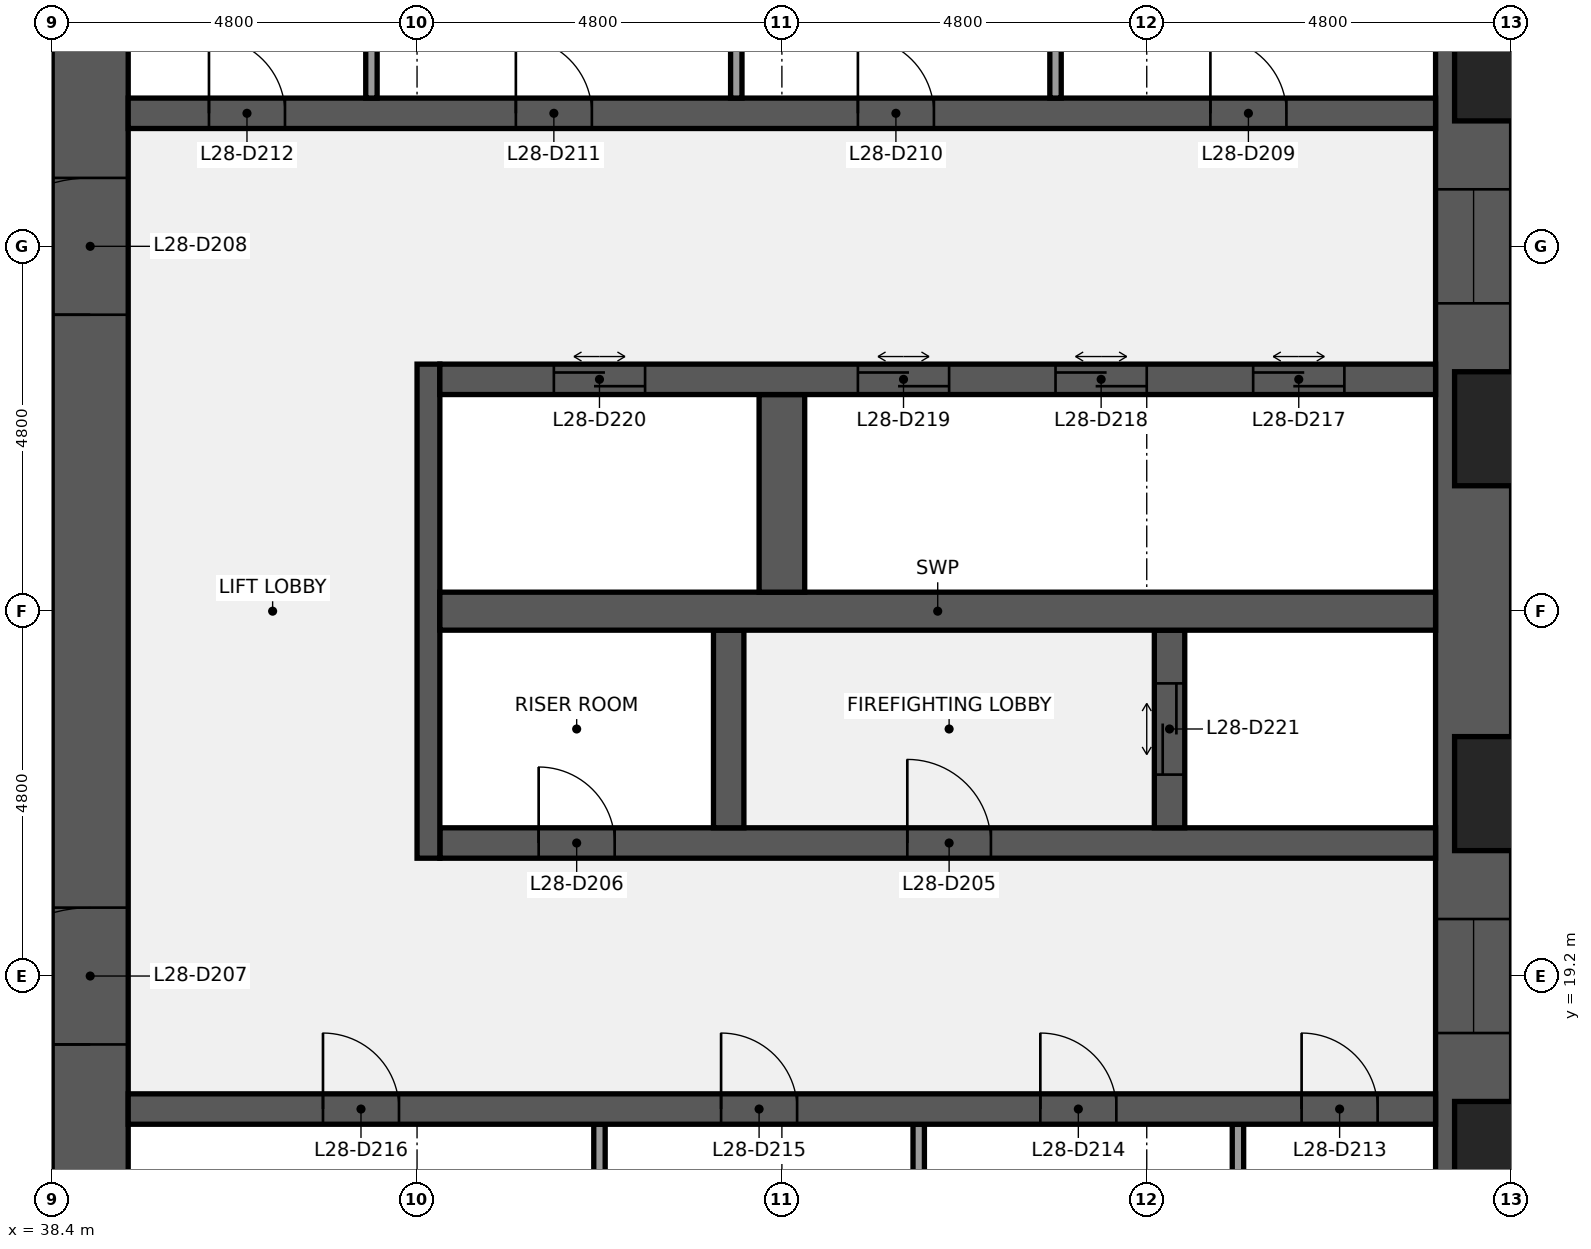
"""IFC4 building model, lengths in metres.
Left out: names, types, materials, properties, quantities, classifications, styles, units other than length and angle.
Written with IfcOpenShell. Run it as: python <this file> out.ifc"""

import sys

from ifc_helpers import new_model, si_unit, direction, frame, frame_2d, origin, place, context, subcontext, project, spatial, rectangle, extrude, element, fill, save


model = new_model("IFC4")
c1 = context("Model", 3, precision=1e-05, world=origin(), true_north=direction((0.0, 1.0)))
c2 = subcontext(c1, "Body", "Model", "MODEL_VIEW")
j1 = project(units=[si_unit("LENGTHUNIT", "METRE"), si_unit("PLANEANGLEUNIT", "RADIAN")], contexts=[c1])
p1 = place(None, origin())
s1 = spatial("IfcSite", under=j1, at=p1, CompositionType="ELEMENT")
p2 = place(p1, origin())
s2 = spatial("IfcBuilding", under=s1, at=p2, CompositionType="ELEMENT")
p3 = place(p2, frame((0.0, 0.0, 132.1)))
s3 = spatial("IfcBuildingStorey", under=s2, at=p3, CompositionType="ELEMENT", Elevation=132.1)
p4 = place(p3, frame((57.1, 38.4, 0.0), z_axis=(0.0, 0.0, 1.0), x_axis=(0.0, -1.0, 0.0)))
e1 = element("IfcWall", 1, at=p4, inside=s3, PredefinedType="SHEAR", context=c2, shape_type="SweptSolid", body=[
    extrude(rectangle(XDim=28.8, YDim=1.0, at=frame_2d((14.4, 0.0))), origin(), (0.0, 0.0, 1.0), 3.84),
])
p5 = place(p4, frame((18.45, 0.0, 0.9)))
e2 = element("IfcOpeningElement", 2, at=p5, cuts=e1, PredefinedType="OPENING", context=c2, shape_type="SweptSolid", body=[
    extrude(rectangle(XDim=1.5, YDim=1.5, at=frame_2d((0.75, 0.75))), frame((0.0, 0.51, 0.0), z_axis=(0.0, -1.0, 0.0), x_axis=(1.0, 0.0, 0.0)), (0.0, 0.0, 1.0), 1.02),
])
p6 = place(p4, frame((8.85, 0.0, 0.9)))
e3 = element("IfcOpeningElement", 3, at=p6, cuts=e1, PredefinedType="OPENING", context=c2, shape_type="SweptSolid", body=[
    extrude(rectangle(XDim=1.5, YDim=1.5, at=frame_2d((0.75, 0.75))), frame((0.0, 0.51, 0.0), z_axis=(0.0, -1.0, 0.0), x_axis=(1.0, 0.0, 0.0)), (0.0, 0.0, 1.0), 1.02),
])
p7 = place(p3, frame((38.9, 9.6, 0.0), z_axis=(0.0, 0.0, 1.0), x_axis=(0.0, 1.0, 0.0)))
e4 = element("IfcWall", 4, at=p7, inside=s3, PredefinedType="SHEAR", context=c2, shape_type="SweptSolid", body=[
    extrude(rectangle(XDim=28.8, YDim=1.0, at=frame_2d((14.4, 0.0))), origin(), (0.0, 0.0, 1.0), 3.84),
])
p8 = place(p7, frame((8.7, 0.0, 0.0)))
e5 = element("IfcOpeningElement", 5, at=p8, cuts=e4, PredefinedType="OPENING", context=c2, shape_type="SweptSolid", body=[
    extrude(rectangle(XDim=1.8, YDim=2.1, at=frame_2d((0.9, 1.05))), frame((0.0, 0.51, 0.0), z_axis=(0.0, -1.0, 0.0), x_axis=(1.0, 0.0, 0.0)), (0.0, 0.0, 1.0), 1.02),
])
p9 = place(p7, frame((18.3, 0.0, 0.0)))
e6 = element("IfcOpeningElement", 6, at=p9, cuts=e4, PredefinedType="OPENING", context=c2, shape_type="SweptSolid", body=[
    extrude(rectangle(XDim=1.8, YDim=2.1, at=frame_2d((0.9, 1.05))), frame((0.0, 0.51, 0.0), z_axis=(0.0, -1.0, 0.0), x_axis=(1.0, 0.0, 0.0)), (0.0, 0.0, 1.0), 1.02),
])
for number, where, z_axis, x_axis in (
    (7, (54.0, 14.65, 0.0), (0.0, 0.0, 1.0), (0.0, 1.0, 0.0)),
    (8, (49.8, 14.65, 0.0), (0.0, 0.0, 1.0), (0.0, 1.0, 0.0)),
    (9, (45.6, 14.65, 0.0), (0.0, 0.0, 1.0), (0.0, 1.0, 0.0)),
):
    element("IfcWall", number, at=place(p3, frame(where, z_axis=z_axis, x_axis=x_axis)), inside=s3, PredefinedType="PARTITIONING", context=c2, shape_type="SweptSolid", body=[
        extrude(rectangle(XDim=2.6, YDim=0.15, at=frame_2d((1.3, 0.0))), origin(), (0.0, 0.0, 1.0), 3.84),
    ])
p10 = place(p3, frame((39.4, 17.45, 0.0), z_axis=(0.0, 0.0, 1.0), x_axis=(1.0, 0.0, 0.0)))
e10 = element("IfcWall", 10, at=p10, inside=s3, PredefinedType="SHEAR", context=c2, shape_type="SweptSolid", body=[
    extrude(rectangle(XDim=17.2, YDim=0.4, at=frame_2d((8.6, 0.0))), origin(), (0.0, 0.0, 1.0), 3.84),
])
p11 = place(p10, frame((15.438, 0.0, 0.0)))
e11 = element("IfcOpeningElement", 11, at=p11, cuts=e10, PredefinedType="OPENING", context=c2, shape_type="SweptSolid", body=[
    extrude(rectangle(XDim=1.0, YDim=2.1, at=frame_2d((0.5, 1.05))), frame((0.0, 0.21, 0.0), z_axis=(0.0, -1.0, 0.0), x_axis=(1.0, 0.0, 0.0)), (0.0, 0.0, 1.0), 0.42),
])
p12 = place(p10, frame((12.0, 0.0, 0.0)))
e12 = element("IfcOpeningElement", 12, at=p12, cuts=e10, PredefinedType="OPENING", context=c2, shape_type="SweptSolid", body=[
    extrude(rectangle(XDim=1.0, YDim=2.1, at=frame_2d((0.5, 1.05))), frame((0.0, 0.21, 0.0), z_axis=(0.0, -1.0, 0.0), x_axis=(1.0, 0.0, 0.0)), (0.0, 0.0, 1.0), 0.42),
])
p13 = place(p10, frame((7.8, 0.0, 0.0)))
e13 = element("IfcOpeningElement", 13, at=p13, cuts=e10, PredefinedType="OPENING", context=c2, shape_type="SweptSolid", body=[
    extrude(rectangle(XDim=1.0, YDim=2.1, at=frame_2d((0.5, 1.05))), frame((0.0, 0.21, 0.0), z_axis=(0.0, -1.0, 0.0), x_axis=(1.0, 0.0, 0.0)), (0.0, 0.0, 1.0), 0.42),
])
p14 = place(p10, frame((2.562, 0.0, 0.0)))
e14 = element("IfcOpeningElement", 14, at=p14, cuts=e10, PredefinedType="OPENING", context=c2, shape_type="SweptSolid", body=[
    extrude(rectangle(XDim=1.0, YDim=2.1, at=frame_2d((0.5, 1.05))), frame((0.0, 0.21, 0.0), z_axis=(0.0, -1.0, 0.0), x_axis=(1.0, 0.0, 0.0)), (0.0, 0.0, 1.0), 0.42),
])
p15 = place(p3, frame((43.5, 20.95, 0.0), z_axis=(0.0, 0.0, 1.0), x_axis=(1.0, 0.0, 0.0)))
e15 = element("IfcWall", 15, at=p15, inside=s3, PredefinedType="SHEAR", context=c2, shape_type="SweptSolid", body=[
    extrude(rectangle(XDim=13.1, YDim=0.4, at=frame_2d((6.55, 0.0))), origin(), (0.0, 0.0, 1.0), 3.84),
])
p16 = place(p15, frame((6.15, 0.0, 0.0)))
e16 = element("IfcOpeningElement", 16, at=p16, cuts=e15, PredefinedType="OPENING", context=c2, shape_type="SweptSolid", body=[
    extrude(rectangle(XDim=1.1, YDim=2.1, at=frame_2d((0.55, 1.05))), frame((0.0, 0.21, 0.0), z_axis=(0.0, -1.0, 0.0), x_axis=(1.0, 0.0, 0.0)), (0.0, 0.0, 1.0), 0.42),
])
p17 = place(p15, frame((1.3, 0.0, 0.0)))
e17 = element("IfcOpeningElement", 17, at=p17, cuts=e15, PredefinedType="OPENING", context=c2, shape_type="SweptSolid", body=[
    extrude(rectangle(XDim=1.0, YDim=2.1, at=frame_2d((0.5, 1.05))), frame((0.0, 0.21, 0.0), z_axis=(0.0, -1.0, 0.0), x_axis=(1.0, 0.0, 0.0)), (0.0, 0.0, 1.0), 0.42),
])
p18 = place(p3, frame((43.35, 20.75, 0.0), z_axis=(0.0, 0.0, 1.0), x_axis=(0.0, 1.0, 0.0)))
e18 = element("IfcWall", 18, at=p18, inside=s3, PredefinedType="SHEAR", context=c2, shape_type="SweptSolid", body=[
    extrude(rectangle(XDim=6.5, YDim=0.3, at=frame_2d((3.25, 0.0))), origin(), (0.0, 0.0, 1.0), 3.84),
])
p19 = place(p3, frame((53.1, 21.15, 0.0), z_axis=(0.0, 0.0, 1.0), x_axis=(0.0, 1.0, 0.0)))
e19 = element("IfcWall", 19, at=p19, inside=s3, PredefinedType="SHEAR", context=c2, shape_type="SweptSolid", body=[
    extrude(rectangle(XDim=2.6, YDim=0.4, at=frame_2d((1.3, 0.0))), origin(), (0.0, 0.0, 1.0), 3.84),
])
p20 = place(p19, frame((0.7, 0.0, 0.0)))
e20 = element("IfcOpeningElement", 20, at=p20, cuts=e19, PredefinedType="OPENING", context=c2, shape_type="SweptSolid", body=[
    extrude(rectangle(XDim=1.2, YDim=2.1, at=frame_2d((0.6, 1.05))), frame((0.0, 0.21, 0.0), z_axis=(0.0, -1.0, 0.0), x_axis=(1.0, 0.0, 0.0)), (0.0, 0.0, 1.0), 0.42),
])
p21 = place(p3, frame((47.3, 21.15, 0.0), z_axis=(0.0, 0.0, 1.0), x_axis=(0.0, 1.0, 0.0)))
e21 = element("IfcWall", 21, at=p21, inside=s3, PredefinedType="SHEAR", context=c2, shape_type="SweptSolid", body=[
    extrude(rectangle(XDim=2.6, YDim=0.4, at=frame_2d((1.3, 0.0))), origin(), (0.0, 0.0, 1.0), 3.84),
])
p22 = place(p3, frame((43.5, 24.0, 0.0), z_axis=(0.0, 0.0, 1.0), x_axis=(1.0, 0.0, 0.0)))
e22 = element("IfcWall", 22, at=p22, inside=s3, PredefinedType="SHEAR", context=c2, shape_type="SweptSolid", body=[
    extrude(rectangle(XDim=13.1, YDim=0.5, at=frame_2d((6.55, 0.0))), origin(), (0.0, 0.0, 1.0), 3.84),
])
p23 = place(p3, frame((48.0, 24.25, 0.0), z_axis=(0.0, 0.0, 1.0), x_axis=(0.0, 1.0, 0.0)))
e23 = element("IfcWall", 23, at=p23, inside=s3, PredefinedType="SHEAR", context=c2, shape_type="SweptSolid", body=[
    extrude(rectangle(XDim=2.6, YDim=0.6, at=frame_2d((1.3, 0.0))), origin(), (0.0, 0.0, 1.0), 3.84),
])
p24 = place(p3, frame((43.5, 27.05, 0.0), z_axis=(0.0, 0.0, 1.0), x_axis=(1.0, 0.0, 0.0)))
e24 = element("IfcWall", 24, at=p24, inside=s3, PredefinedType="SHEAR", context=c2, shape_type="SweptSolid", body=[
    extrude(rectangle(XDim=13.1, YDim=0.4, at=frame_2d((6.55, 0.0))), origin(), (0.0, 0.0, 1.0), 3.84),
])
p25 = place(p24, frame((10.7, 0.0, 0.0)))
e25 = element("IfcOpeningElement", 25, at=p25, cuts=e24, PredefinedType="OPENING", context=c2, shape_type="SweptSolid", body=[
    extrude(rectangle(XDim=1.2, YDim=2.1, at=frame_2d((0.6, 1.05))), frame((0.0, 0.21, 0.0), z_axis=(0.0, -1.0, 0.0), x_axis=(1.0, 0.0, 0.0)), (0.0, 0.0, 1.0), 0.42),
])
p26 = place(p24, frame((8.1, 0.0, 0.0)))
e26 = element("IfcOpeningElement", 26, at=p26, cuts=e24, PredefinedType="OPENING", context=c2, shape_type="SweptSolid", body=[
    extrude(rectangle(XDim=1.2, YDim=2.1, at=frame_2d((0.6, 1.05))), frame((0.0, 0.21, 0.0), z_axis=(0.0, -1.0, 0.0), x_axis=(1.0, 0.0, 0.0)), (0.0, 0.0, 1.0), 0.42),
])
p27 = place(p24, frame((5.5, 0.0, 0.0)))
e27 = element("IfcOpeningElement", 27, at=p27, cuts=e24, PredefinedType="OPENING", context=c2, shape_type="SweptSolid", body=[
    extrude(rectangle(XDim=1.2, YDim=2.1, at=frame_2d((0.6, 1.05))), frame((0.0, 0.21, 0.0), z_axis=(0.0, -1.0, 0.0), x_axis=(1.0, 0.0, 0.0)), (0.0, 0.0, 1.0), 0.42),
])
p28 = place(p24, frame((1.5, 0.0, 0.0)))
e28 = element("IfcOpeningElement", 28, at=p28, cuts=e24, PredefinedType="OPENING", context=c2, shape_type="SweptSolid", body=[
    extrude(rectangle(XDim=1.2, YDim=2.1, at=frame_2d((0.6, 1.05))), frame((0.0, 0.21, 0.0), z_axis=(0.0, -1.0, 0.0), x_axis=(1.0, 0.0, 0.0)), (0.0, 0.0, 1.0), 0.42),
])
p29 = place(p3, frame((39.4, 30.55, 0.0), z_axis=(0.0, 0.0, 1.0), x_axis=(1.0, 0.0, 0.0)))
e29 = element("IfcWall", 29, at=p29, inside=s3, PredefinedType="SHEAR", context=c2, shape_type="SweptSolid", body=[
    extrude(rectangle(XDim=17.2, YDim=0.4, at=frame_2d((8.6, 0.0))), origin(), (0.0, 0.0, 1.0), 3.84),
])
p30 = place(p29, frame((14.238, 0.0, 0.0)))
e30 = element("IfcOpeningElement", 30, at=p30, cuts=e29, PredefinedType="OPENING", context=c2, shape_type="SweptSolid", body=[
    extrude(rectangle(XDim=1.0, YDim=2.1, at=frame_2d((0.5, 1.05))), frame((0.0, 0.21, 0.0), z_axis=(0.0, -1.0, 0.0), x_axis=(1.0, 0.0, 0.0)), (0.0, 0.0, 1.0), 0.42),
])
p31 = place(p29, frame((9.6, 0.0, 0.0)))
e31 = element("IfcOpeningElement", 31, at=p31, cuts=e29, PredefinedType="OPENING", context=c2, shape_type="SweptSolid", body=[
    extrude(rectangle(XDim=1.0, YDim=2.1, at=frame_2d((0.5, 1.05))), frame((0.0, 0.21, 0.0), z_axis=(0.0, -1.0, 0.0), x_axis=(1.0, 0.0, 0.0)), (0.0, 0.0, 1.0), 0.42),
])
p32 = place(p29, frame((5.1, 0.0, 0.0)))
e32 = element("IfcOpeningElement", 32, at=p32, cuts=e29, PredefinedType="OPENING", context=c2, shape_type="SweptSolid", body=[
    extrude(rectangle(XDim=1.0, YDim=2.1, at=frame_2d((0.5, 1.05))), frame((0.0, 0.21, 0.0), z_axis=(0.0, -1.0, 0.0), x_axis=(1.0, 0.0, 0.0)), (0.0, 0.0, 1.0), 0.42),
])
p33 = place(p29, frame((1.062, 0.0, 0.0)))
e33 = element("IfcOpeningElement", 33, at=p33, cuts=e29, PredefinedType="OPENING", context=c2, shape_type="SweptSolid", body=[
    extrude(rectangle(XDim=1.0, YDim=2.1, at=frame_2d((0.5, 1.05))), frame((0.0, 0.21, 0.0), z_axis=(0.0, -1.0, 0.0), x_axis=(1.0, 0.0, 0.0)), (0.0, 0.0, 1.0), 0.42),
])
for number, where, z_axis, x_axis in (
    (34, (51.6, 30.75, 0.0), (0.0, 0.0, 1.0), (0.0, 1.0, 0.0)),
    (35, (47.4, 30.75, 0.0), (0.0, 0.0, 1.0), (0.0, 1.0, 0.0)),
    (36, (42.6, 30.75, 0.0), (0.0, 0.0, 1.0), (0.0, 1.0, 0.0)),
):
    element("IfcWall", number, at=place(p3, frame(where, z_axis=z_axis, x_axis=x_axis)), inside=s3, PredefinedType="PARTITIONING", context=c2, shape_type="SweptSolid", body=[
        extrude(rectangle(XDim=2.6, YDim=0.15, at=frame_2d((1.3, 0.0))), origin(), (0.0, 0.0, 1.0), 3.84),
    ])
p34 = place(p16, origin())
e37 = element("IfcDoor", 37, at=p34, inside=s3, OperationType="SINGLE_SWING_LEFT", PredefinedType="DOOR", context=c2, shape_type="SweptSolid", body=[
    extrude(rectangle(XDim=1.1, YDim=2.1, at=frame_2d((0.55, 1.05))), frame((0.0, 0.025, 0.0), z_axis=(0.0, -1.0, 0.0), x_axis=(1.0, 0.0, 0.0)), (0.0, 0.0, 1.0), 0.05),
])
fill(e16, e37)
p35 = place(p17, origin())
e38 = element("IfcDoor", 38, at=p35, inside=s3, OperationType="SINGLE_SWING_LEFT", PredefinedType="DOOR", context=c2, shape_type="SweptSolid", body=[
    extrude(rectangle(XDim=1.0, YDim=2.1, at=frame_2d((0.5, 1.05))), frame((0.0, 0.025, 0.0), z_axis=(0.0, -1.0, 0.0), x_axis=(1.0, 0.0, 0.0)), (0.0, 0.0, 1.0), 0.05),
])
fill(e17, e38)
p36 = place(p8, origin())
e39 = element("IfcDoor", 39, at=p36, inside=s3, OperationType="DOUBLE_DOOR_SINGLE_SWING", PredefinedType="DOOR", context=c2, shape_type="SweptSolid", body=[
    extrude(rectangle(XDim=1.8, YDim=2.1, at=frame_2d((0.9, 1.05))), frame((0.0, 0.025, 0.0), z_axis=(0.0, -1.0, 0.0), x_axis=(1.0, 0.0, 0.0)), (0.0, 0.0, 1.0), 0.05),
])
fill(e5, e39)
p37 = place(p9, origin())
e40 = element("IfcDoor", 40, at=p37, inside=s3, OperationType="DOUBLE_DOOR_SINGLE_SWING", PredefinedType="DOOR", context=c2, shape_type="SweptSolid", body=[
    extrude(rectangle(XDim=1.8, YDim=2.1, at=frame_2d((0.9, 1.05))), frame((0.0, 0.025, 0.0), z_axis=(0.0, -1.0, 0.0), x_axis=(1.0, 0.0, 0.0)), (0.0, 0.0, 1.0), 0.05),
])
fill(e6, e40)
p38 = place(p30, origin())
e41 = element("IfcDoor", 41, at=p38, inside=s3, OperationType="SINGLE_SWING_LEFT", PredefinedType="DOOR", context=c2, shape_type="SweptSolid", body=[
    extrude(rectangle(XDim=1.0, YDim=2.1, at=frame_2d((0.5, 1.05))), frame((0.0, 0.025, 0.0), z_axis=(0.0, -1.0, 0.0), x_axis=(1.0, 0.0, 0.0)), (0.0, 0.0, 1.0), 0.05),
])
fill(e30, e41)
p39 = place(p31, origin())
e42 = element("IfcDoor", 42, at=p39, inside=s3, OperationType="SINGLE_SWING_LEFT", PredefinedType="DOOR", context=c2, shape_type="SweptSolid", body=[
    extrude(rectangle(XDim=1.0, YDim=2.1, at=frame_2d((0.5, 1.05))), frame((0.0, 0.025, 0.0), z_axis=(0.0, -1.0, 0.0), x_axis=(1.0, 0.0, 0.0)), (0.0, 0.0, 1.0), 0.05),
])
fill(e31, e42)
p40 = place(p32, origin())
e43 = element("IfcDoor", 43, at=p40, inside=s3, OperationType="SINGLE_SWING_LEFT", PredefinedType="DOOR", context=c2, shape_type="SweptSolid", body=[
    extrude(rectangle(XDim=1.0, YDim=2.1, at=frame_2d((0.5, 1.05))), frame((0.0, 0.025, 0.0), z_axis=(0.0, -1.0, 0.0), x_axis=(1.0, 0.0, 0.0)), (0.0, 0.0, 1.0), 0.05),
])
fill(e32, e43)
p41 = place(p33, origin())
e44 = element("IfcDoor", 44, at=p41, inside=s3, OperationType="SINGLE_SWING_LEFT", PredefinedType="DOOR", context=c2, shape_type="SweptSolid", body=[
    extrude(rectangle(XDim=1.0, YDim=2.1, at=frame_2d((0.5, 1.05))), frame((0.0, 0.025, 0.0), z_axis=(0.0, -1.0, 0.0), x_axis=(1.0, 0.0, 0.0)), (0.0, 0.0, 1.0), 0.05),
])
fill(e33, e44)
p42 = place(p11, origin())
e45 = element("IfcDoor", 45, at=p42, inside=s3, OperationType="SINGLE_SWING_LEFT", PredefinedType="DOOR", context=c2, shape_type="SweptSolid", body=[
    extrude(rectangle(XDim=1.0, YDim=2.1, at=frame_2d((0.5, 1.05))), frame((0.0, 0.025, 0.0), z_axis=(0.0, -1.0, 0.0), x_axis=(1.0, 0.0, 0.0)), (0.0, 0.0, 1.0), 0.05),
])
fill(e11, e45)
p43 = place(p12, origin())
e46 = element("IfcDoor", 46, at=p43, inside=s3, OperationType="SINGLE_SWING_LEFT", PredefinedType="DOOR", context=c2, shape_type="SweptSolid", body=[
    extrude(rectangle(XDim=1.0, YDim=2.1, at=frame_2d((0.5, 1.05))), frame((0.0, 0.025, 0.0), z_axis=(0.0, -1.0, 0.0), x_axis=(1.0, 0.0, 0.0)), (0.0, 0.0, 1.0), 0.05),
])
fill(e12, e46)
p44 = place(p13, origin())
e47 = element("IfcDoor", 47, at=p44, inside=s3, OperationType="SINGLE_SWING_LEFT", PredefinedType="DOOR", context=c2, shape_type="SweptSolid", body=[
    extrude(rectangle(XDim=1.0, YDim=2.1, at=frame_2d((0.5, 1.05))), frame((0.0, 0.025, 0.0), z_axis=(0.0, -1.0, 0.0), x_axis=(1.0, 0.0, 0.0)), (0.0, 0.0, 1.0), 0.05),
])
fill(e13, e47)
p45 = place(p14, origin())
e48 = element("IfcDoor", 48, at=p45, inside=s3, OperationType="SINGLE_SWING_LEFT", PredefinedType="DOOR", context=c2, shape_type="SweptSolid", body=[
    extrude(rectangle(XDim=1.0, YDim=2.1, at=frame_2d((0.5, 1.05))), frame((0.0, 0.025, 0.0), z_axis=(0.0, -1.0, 0.0), x_axis=(1.0, 0.0, 0.0)), (0.0, 0.0, 1.0), 0.05),
])
fill(e14, e48)
p46 = place(p25, origin())
e49 = element("IfcDoor", 49, at=p46, inside=s3, OperationType="DOUBLE_DOOR_SLIDING", PredefinedType="DOOR", context=c2, shape_type="SweptSolid", body=[
    extrude(rectangle(XDim=1.2, YDim=2.1, at=frame_2d((0.6, 1.05))), frame((0.0, 0.025, 0.0), z_axis=(0.0, -1.0, 0.0), x_axis=(1.0, 0.0, 0.0)), (0.0, 0.0, 1.0), 0.05),
])
fill(e25, e49)
p47 = place(p26, origin())
e50 = element("IfcDoor", 50, at=p47, inside=s3, OperationType="DOUBLE_DOOR_SLIDING", PredefinedType="DOOR", context=c2, shape_type="SweptSolid", body=[
    extrude(rectangle(XDim=1.2, YDim=2.1, at=frame_2d((0.6, 1.05))), frame((0.0, 0.025, 0.0), z_axis=(0.0, -1.0, 0.0), x_axis=(1.0, 0.0, 0.0)), (0.0, 0.0, 1.0), 0.05),
])
fill(e26, e50)
p48 = place(p27, origin())
e51 = element("IfcDoor", 51, at=p48, inside=s3, OperationType="DOUBLE_DOOR_SLIDING", PredefinedType="DOOR", context=c2, shape_type="SweptSolid", body=[
    extrude(rectangle(XDim=1.2, YDim=2.1, at=frame_2d((0.6, 1.05))), frame((0.0, 0.025, 0.0), z_axis=(0.0, -1.0, 0.0), x_axis=(1.0, 0.0, 0.0)), (0.0, 0.0, 1.0), 0.05),
])
fill(e27, e51)
p49 = place(p28, origin())
e52 = element("IfcDoor", 52, at=p49, inside=s3, OperationType="DOUBLE_DOOR_SLIDING", PredefinedType="DOOR", context=c2, shape_type="SweptSolid", body=[
    extrude(rectangle(XDim=1.2, YDim=2.1, at=frame_2d((0.6, 1.05))), frame((0.0, 0.025, 0.0), z_axis=(0.0, -1.0, 0.0), x_axis=(1.0, 0.0, 0.0)), (0.0, 0.0, 1.0), 0.05),
])
fill(e28, e52)
p50 = place(p20, origin())
e53 = element("IfcDoor", 53, at=p50, inside=s3, OperationType="DOUBLE_DOOR_SLIDING", PredefinedType="DOOR", context=c2, shape_type="SweptSolid", body=[
    extrude(rectangle(XDim=1.2, YDim=2.1, at=frame_2d((0.6, 1.05))), frame((0.0, 0.025, 0.0), z_axis=(0.0, -1.0, 0.0), x_axis=(1.0, 0.0, 0.0)), (0.0, 0.0, 1.0), 0.05),
])
fill(e20, e53)
p51 = place(p5, origin())
e54 = element("IfcWindow", 54, at=p51, inside=s3, PartitioningType="SINGLE_PANEL", PredefinedType="WINDOW", context=c2, shape_type="SweptSolid", body=[
    extrude(rectangle(XDim=1.5, YDim=1.5, at=frame_2d((0.75, 0.75))), frame((0.0, 0.03, 0.0), z_axis=(0.0, -1.0, 0.0), x_axis=(1.0, 0.0, 0.0)), (0.0, 0.0, 1.0), 0.06),
])
fill(e2, e54)
p52 = place(p6, origin())
e55 = element("IfcWindow", 55, at=p52, inside=s3, PartitioningType="SINGLE_PANEL", PredefinedType="WINDOW", context=c2, shape_type="SweptSolid", body=[
    extrude(rectangle(XDim=1.5, YDim=1.5, at=frame_2d((0.75, 0.75))), frame((0.0, 0.03, 0.0), z_axis=(0.0, -1.0, 0.0), x_axis=(1.0, 0.0, 0.0)), (0.0, 0.0, 1.0), 0.06),
])
fill(e3, e55)
save(model, sys.argv[1])
